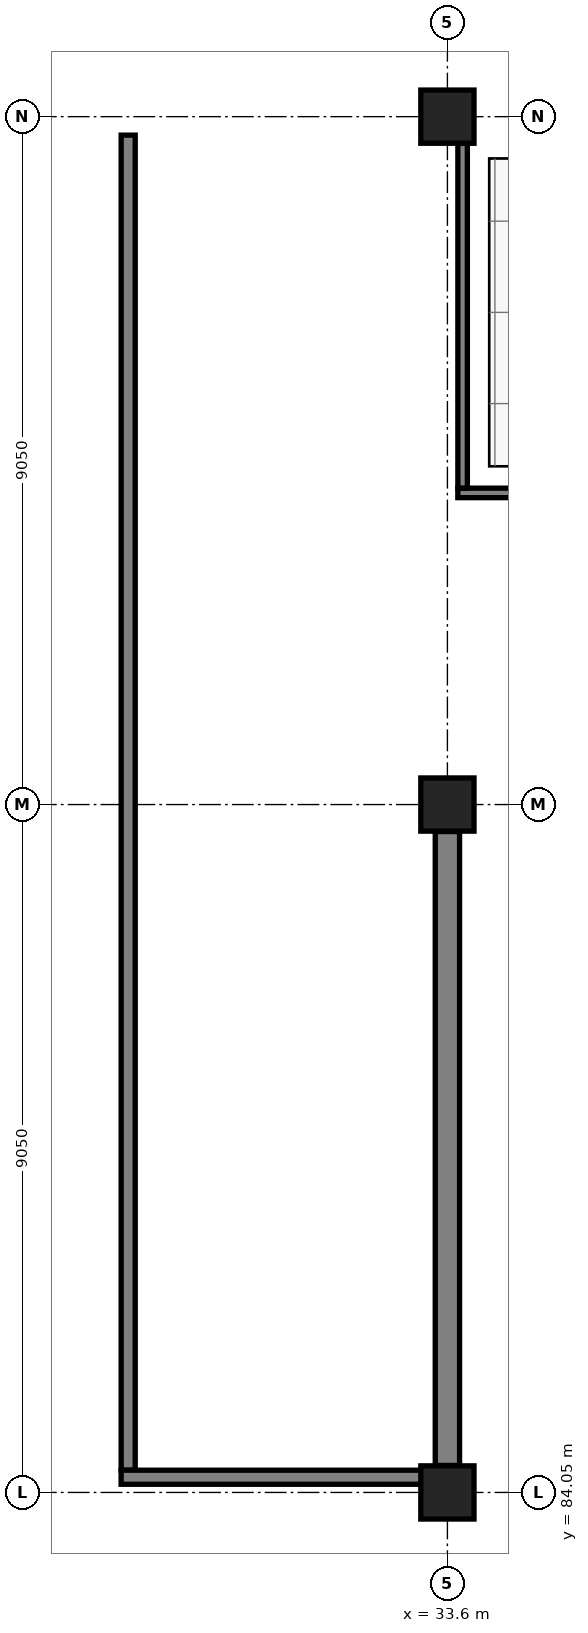
"""IFC4 building model, lengths in metres.
Left out: names, types, materials, properties, quantities, classifications, styles, units other than length and angle.
Written with IfcOpenShell. Run it as: python <this file> out.ifc"""

import sys

from ifc_helpers import new_model, si_unit, direction, frame, frame_2d, origin, origin_2d, place, context, subcontext, project, spatial, rectangle, extrude, element, fill, save


model = new_model("IFC4")
c1 = context("Model", 3, precision=1e-05, world=origin(), true_north=direction((0.0, 1.0)))
c2 = subcontext(c1, "Body", "Model", "MODEL_VIEW")
j1 = project(units=[si_unit("LENGTHUNIT", "METRE"), si_unit("PLANEANGLEUNIT", "RADIAN")], contexts=[c1])
p1 = place(None, origin())
s1 = spatial("IfcSite", under=j1, at=p1, CompositionType="ELEMENT")
p2 = place(p1, origin())
s2 = spatial("IfcBuilding", under=s1, at=p2, CompositionType="ELEMENT")
p3 = place(p2, origin())
s3 = spatial("IfcBuildingStorey", under=s2, at=p3, CompositionType="ELEMENT", Elevation=0.0)
for number, where, z_axis, x_axis in (
    (1, (33.6, 84.05, 0.0), (0.0, 0.0, 1.0), (1.0, 0.0, 0.0)),
    (2, (33.6, 93.1, 0.0), (0.0, 0.0, 1.0), (1.0, 0.0, 0.0)),
    (3, (33.6, 102.15, 0.0), (0.0, 0.0, 1.0), (1.0, 0.0, 0.0)),
):
    element("IfcColumn", number, at=place(p3, frame(where, z_axis=z_axis, x_axis=x_axis)), inside=s3, PredefinedType="COLUMN", context=c2, shape_type="SweptSolid", body=[
        extrude(rectangle(XDim=0.7, YDim=0.7, at=origin_2d()), origin(), (0.0, 0.0, 1.0), 5.4),
    ])
p4 = place(p3, frame((33.6, 84.405, 0.0), z_axis=(0.0, 0.0, 1.0), x_axis=(0.0, 1.0, 0.0)))
e4 = element("IfcWall", 4, at=p4, inside=s3, PredefinedType="STANDARD", context=c2, shape_type="SweptSolid", body=[
    extrude(rectangle(XDim=8.34, YDim=0.32, at=frame_2d((4.17, 0.0))), origin(), (0.0, 0.0, 1.0), 4.24),
])
p5 = place(p4, frame((3.13, 0.0, 0.95)))
e5 = element("IfcOpeningElement", 5, at=p5, cuts=e4, PredefinedType="OPENING", context=c2, shape_type="SweptSolid", body=[
    extrude(rectangle(XDim=2.08, YDim=2.28, at=frame_2d((1.04, 1.14))), frame((0.0, 0.17, 0.0), z_axis=(0.0, -1.0, 0.0), x_axis=(1.0, 0.0, 0.0)), (0.0, 0.0, 1.0), 0.34),
])
p6 = place(p3, frame((29.4, 84.343, 0.0), z_axis=(0.0, 0.0, 1.0), x_axis=(0.0, 1.0, 0.0)))
e6 = element("IfcWall", 6, at=p6, inside=s3, PredefinedType="PARTITIONING", context=c2, shape_type="SweptSolid", body=[
    extrude(rectangle(XDim=17.564, YDim=0.185, at=frame_2d((8.782, 0.0))), origin(), (0.0, 0.0, 1.0), 4.23),
])
p7 = place(p6, frame((8.232, 0.0, 0.0)))
e7 = element("IfcOpeningElement", 7, at=p7, cuts=e6, PredefinedType="OPENING", context=c2, shape_type="SweptSolid", body=[
    extrude(rectangle(XDim=1.1, YDim=2.3, at=frame_2d((0.55, 1.15))), frame((0.0, 0.103, 0.0), z_axis=(0.0, -1.0, 0.0), x_axis=(1.0, 0.0, 0.0)), (0.0, 0.0, 1.0), 0.205),
])
p8 = place(p6, frame((9.932, 0.0, 1.05)))
e8 = element("IfcOpeningElement", 8, at=p8, cuts=e6, PredefinedType="OPENING", context=c2, shape_type="SweptSolid", body=[
    extrude(rectangle(XDim=2.7, YDim=1.4, at=frame_2d((1.35, 0.7))), frame((0.0, 0.103, 0.0), z_axis=(0.0, -1.0, 0.0), x_axis=(1.0, 0.0, 0.0)), (0.0, 0.0, 1.0), 0.205),
])
p9 = place(p3, frame((29.307, 84.25, 0.0), z_axis=(0.0, 0.0, 1.0), x_axis=(1.0, 0.0, 0.0)))
e9 = element("IfcWall", 9, at=p9, inside=s3, PredefinedType="PARTITIONING", context=c2, shape_type="SweptSolid", body=[
    extrude(rectangle(XDim=4.185, YDim=0.185, at=frame_2d((2.093, 0.0))), origin(), (0.0, 0.0, 1.0), 4.23),
])
p10 = place(p3, frame((33.737, 97.2, 0.0), z_axis=(0.0, 0.0, 1.0), x_axis=(1.0, 0.0, 0.0)))
e10 = element("IfcWall", 10, at=p10, inside=s3, PredefinedType="PARTITIONING", context=c2, shape_type="SweptSolid", body=[
    extrude(rectangle(XDim=24.926, YDim=0.125, at=frame_2d((12.463, 0.0))), origin(), (0.0, 0.0, 1.0), 4.14),
])
p11 = place(p10, frame((11.853, 0.0, 0.0)))
e11 = element("IfcOpeningElement", 11, at=p11, cuts=e10, PredefinedType="OPENING", context=c2, shape_type="SweptSolid", body=[
    extrude(rectangle(XDim=1.22, YDim=2.35, at=frame_2d((0.61, 1.175))), frame((0.0, 0.073, 0.0), z_axis=(0.0, -1.0, 0.0), x_axis=(1.0, 0.0, 0.0)), (0.0, 0.0, 1.0), 0.145),
])
p12 = place(p10, frame((13.673, 0.0, 1.05)))
e12 = element("IfcOpeningElement", 12, at=p12, cuts=e10, PredefinedType="OPENING", context=c2, shape_type="SweptSolid", body=[
    extrude(rectangle(XDim=3.0, YDim=1.45, at=frame_2d((1.5, 0.725))), frame((0.0, 0.073, 0.0), z_axis=(0.0, -1.0, 0.0), x_axis=(1.0, 0.0, 0.0)), (0.0, 0.0, 1.0), 0.145),
])
p13 = place(p3, frame((33.8, 97.263, 0.0), z_axis=(0.0, 0.0, 1.0), x_axis=(0.0, 1.0, 0.0)))
e13 = element("IfcWall", 13, at=p13, inside=s3, PredefinedType="PARTITIONING", context=c2, shape_type="SweptSolid", body=[
    extrude(rectangle(XDim=4.625, YDim=0.125, at=frame_2d((2.312, 0.0))), origin(), (0.0, 0.0, 1.0), 4.23),
])
p14 = place(p5, origin())
e14 = element("IfcWindow", 14, at=p14, inside=s3, PartitioningType="SINGLE_PANEL", PredefinedType="WINDOW", context=c2, shape_type="SweptSolid", body=[
    extrude(rectangle(XDim=2.08, YDim=2.28, at=frame_2d((1.04, 1.14))), frame((0.0, 0.03, 0.0), z_axis=(0.0, -1.0, 0.0), x_axis=(1.0, 0.0, 0.0)), (0.0, 0.0, 1.0), 0.06),
])
fill(e5, e14)
p15 = place(p7, frame((1.1, 0.0, 0.0), z_axis=(0.0, 0.0, 1.0), x_axis=(-1.0, 0.0, 0.0)))
e15 = element("IfcDoor", 15, at=p15, inside=s3, OperationType="SINGLE_SWING_RIGHT", PredefinedType="DOOR", context=c2, shape_type="SweptSolid", body=[
    extrude(rectangle(XDim=1.1, YDim=2.3, at=frame_2d((0.55, 1.15))), frame((0.0, 0.025, 0.0), z_axis=(0.0, -1.0, 0.0), x_axis=(1.0, 0.0, 0.0)), (0.0, 0.0, 1.0), 0.05),
])
fill(e7, e15)
p16 = place(p8, origin())
e16 = element("IfcWindow", 16, at=p16, inside=s3, PartitioningType="SINGLE_PANEL", PredefinedType="WINDOW", context=c2, shape_type="SweptSolid", body=[
    extrude(rectangle(XDim=2.7, YDim=1.4, at=frame_2d((1.35, 0.7))), frame((0.0, 0.03, 0.0), z_axis=(0.0, -1.0, 0.0), x_axis=(1.0, 0.0, 0.0)), (0.0, 0.0, 1.0), 0.06),
])
fill(e8, e16)
save(model, sys.argv[1])
